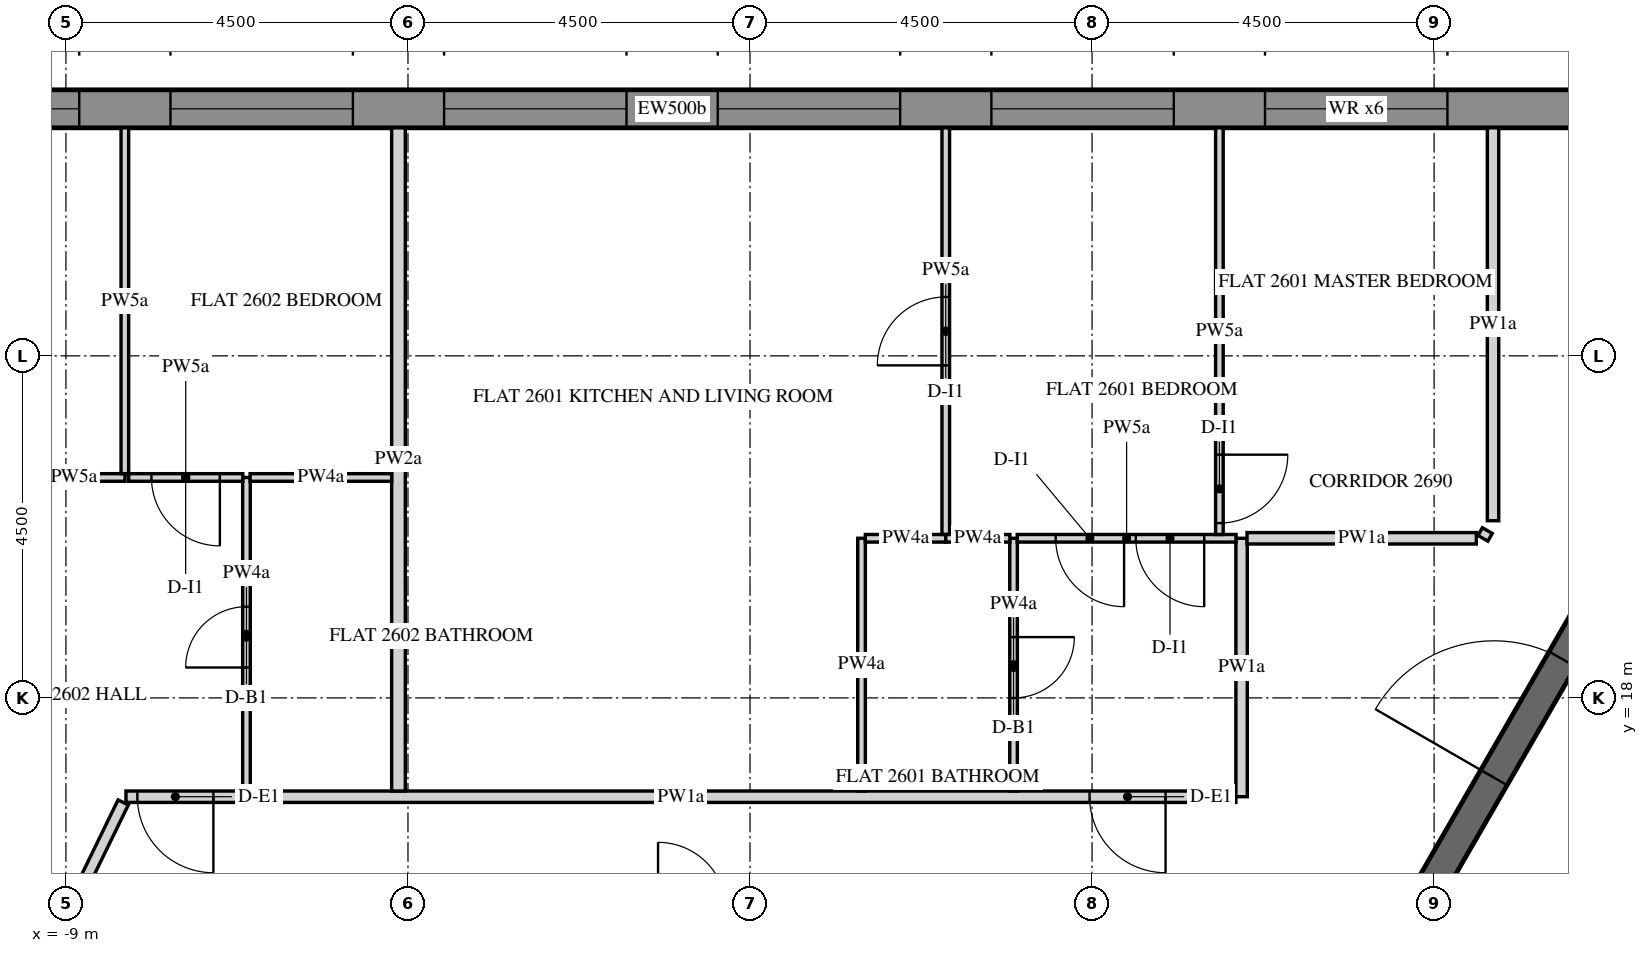
"""IFC4 building model, lengths in metres.
Left out: names, types, materials, properties, quantities, classifications, styles, units other than length and angle.
Written with IfcOpenShell. Run it as: python <this file> out.ifc"""

import sys

from ifc_helpers import new_model, si_unit, direction, frame, frame_2d, origin, place, context, subcontext, project, spatial, polyline, rectangle, outline, extrude, element, fill, save


model = new_model("IFC4")
c1 = context("Model", 3, precision=1e-05, world=origin(), true_north=direction((0.0, 1.0)))
c2 = subcontext(c1, "Body", "Model", "MODEL_VIEW")
j1 = project(units=[si_unit("LENGTHUNIT", "METRE"), si_unit("PLANEANGLEUNIT", "RADIAN")], contexts=[c1])
p1 = place(None, origin())
s1 = spatial("IfcSite", under=j1, at=p1, CompositionType="ELEMENT")
p2 = place(p1, origin())
s2 = spatial("IfcBuilding", under=s1, at=p2, CompositionType="ELEMENT")
p3 = place(p2, frame((0.0, 0.0, 334.2)))
s3 = spatial("IfcBuildingStorey", under=s2, at=p3, CompositionType="ELEMENT", Elevation=334.2)
p4 = place(p3, frame((11.698, 25.75, -0.15), z_axis=(0.0, 0.0, 1.0), x_axis=(-1.0, 0.0, 0.0)))
e1 = element("IfcWall", 1, at=p4, inside=s3, PredefinedType="SOLIDWALL", context=c2, shape_type="SweptSolid", body=[
    extrude(outline(polyline([(-0.021, -0.25), (25.468, -0.25), (25.421, 0.25), (0.021, 0.25), (-0.021, -0.25)])), origin(), (0.0, 0.0, 1.0), 3.75),
])
p5 = place(p4, frame((2.522, 0.0, 0.75)))
e2 = element("IfcOpeningElement", 2, at=p5, cuts=e1, PredefinedType="OPENING", context=c2, shape_type="SweptSolid", body=[
    extrude(rectangle(XDim=2.4, YDim=2.7, at=frame_2d((1.2, 1.35))), frame((0.0, 0.26, 0.0), z_axis=(0.0, -1.0, 0.0), x_axis=(1.0, 0.0, 0.0)), (0.0, 0.0, 1.0), 0.52),
])
p6 = place(p4, frame((6.122, 0.0, 0.75)))
e3 = element("IfcOpeningElement", 3, at=p6, cuts=e1, PredefinedType="OPENING", context=c2, shape_type="SweptSolid", body=[
    extrude(rectangle(XDim=2.4, YDim=2.7, at=frame_2d((1.2, 1.35))), frame((0.0, 0.26, 0.0), z_axis=(0.0, -1.0, 0.0), x_axis=(1.0, 0.0, 0.0)), (0.0, 0.0, 1.0), 0.52),
])
p7 = place(p4, frame((9.722, 0.0, 0.75)))
e4 = element("IfcOpeningElement", 4, at=p7, cuts=e1, PredefinedType="OPENING", context=c2, shape_type="SweptSolid", body=[
    extrude(rectangle(XDim=2.4, YDim=2.7, at=frame_2d((1.2, 1.35))), frame((0.0, 0.26, 0.0), z_axis=(0.0, -1.0, 0.0), x_axis=(1.0, 0.0, 0.0)), (0.0, 0.0, 1.0), 0.52),
])
p8 = place(p4, frame((13.323, 0.0, 0.75)))
e5 = element("IfcOpeningElement", 5, at=p8, cuts=e1, PredefinedType="OPENING", context=c2, shape_type="SweptSolid", body=[
    extrude(rectangle(XDim=2.4, YDim=2.7, at=frame_2d((1.2, 1.35))), frame((0.0, 0.26, 0.0), z_axis=(0.0, -1.0, 0.0), x_axis=(1.0, 0.0, 0.0)), (0.0, 0.0, 1.0), 0.52),
])
p9 = place(p4, frame((16.922, 0.0, 0.75)))
e6 = element("IfcOpeningElement", 6, at=p9, cuts=e1, PredefinedType="OPENING", context=c2, shape_type="SweptSolid", body=[
    extrude(rectangle(XDim=2.4, YDim=2.7, at=frame_2d((1.2, 1.35))), frame((0.0, 0.26, 0.0), z_axis=(0.0, -1.0, 0.0), x_axis=(1.0, 0.0, 0.0)), (0.0, 0.0, 1.0), 0.52),
])
p10 = place(p4, frame((20.522, 0.0, 0.75)))
e7 = element("IfcOpeningElement", 7, at=p10, cuts=e1, PredefinedType="OPENING", context=c2, shape_type="SweptSolid", body=[
    extrude(rectangle(XDim=2.4, YDim=2.7, at=frame_2d((1.2, 1.35))), frame((0.0, 0.26, 0.0), z_axis=(0.0, -1.0, 0.0), x_axis=(1.0, 0.0, 0.0)), (0.0, 0.0, 1.0), 0.52),
])
p11 = place(p3, frame((6.351, 11.0, -0.15), z_axis=(0.0, 0.0, 1.0), x_axis=(0.499998894578, 0.866026041999, 0.0)))
e8 = element("IfcWall", 8, at=p11, inside=s3, PredefinedType="SHEAR", context=c2, shape_type="SweptSolid", body=[
    extrude(rectangle(XDim=15.544, YDim=0.4, at=frame_2d((7.772, 0.0))), origin(), (0.0, 0.0, 1.0), 3.75),
])
p12 = place(p11, frame((6.872, 0.0, 0.15)))
e9 = element("IfcOpeningElement", 9, at=p12, cuts=e8, PredefinedType="OPENING", context=c2, shape_type="SweptSolid", body=[
    extrude(rectangle(XDim=1.8, YDim=2.4, at=frame_2d((0.9, 1.2))), frame((0.0, 0.21, 0.0), z_axis=(0.0, -1.0, 0.0), x_axis=(1.0, 0.0, 0.0)), (0.0, 0.0, 1.0), 0.42),
])
p13 = place(p3, frame((6.392, 16.7, 0.0), z_axis=(0.0, 0.0, 1.0), x_axis=(-1.0, 0.0, 0.0)))
e10 = element("IfcWall", 10, at=p13, inside=s3, PredefinedType="PARTITIONING", context=c2, shape_type="SweptSolid", body=[
    extrude(rectangle(XDim=14.602, YDim=0.15, at=frame_2d((7.301, 0.0))), origin(), (0.0, 0.0, 1.0), 2.838),
])
p14 = place(p13, frame((0.925, 0.0, 0.0)))
e11 = element("IfcOpeningElement", 11, at=p14, cuts=e10, PredefinedType="OPENING", context=c2, shape_type="SweptSolid", body=[
    extrude(rectangle(XDim=1.0, YDim=2.1, at=frame_2d((0.5, 1.05))), frame((0.0, 0.085, 0.0), z_axis=(0.0, -1.0, 0.0), x_axis=(1.0, 0.0, 0.0)), (0.0, 0.0, 1.0), 0.17),
])
p15 = place(p13, frame((13.452, 0.0, 0.0)))
e12 = element("IfcOpeningElement", 12, at=p15, cuts=e10, PredefinedType="OPENING", context=c2, shape_type="SweptSolid", body=[
    extrude(rectangle(XDim=1.0, YDim=2.1, at=frame_2d((0.5, 1.05))), frame((0.0, 0.085, 0.0), z_axis=(0.0, -1.0, 0.0), x_axis=(1.0, 0.0, 0.0)), (0.0, 0.0, 1.0), 0.17),
])
p16 = place(p3, frame((6.467, 20.1, 0.0), z_axis=(0.0, 0.0, 1.0), x_axis=(0.0, -1.0, 0.0)))
e13 = element("IfcWall", 13, at=p16, inside=s3, PredefinedType="PARTITIONING", context=c2, shape_type="SweptSolid", body=[
    extrude(rectangle(XDim=3.4, YDim=0.15, at=frame_2d((1.7, 0.0))), origin(), (0.0, 0.0, 1.0), 2.838),
])
p17 = place(p3, frame((9.775, 25.5, 0.0), z_axis=(0.0, 0.0, 1.0), x_axis=(0.0, -1.0, 0.0)))
e14 = element("IfcWall", 14, at=p17, inside=s3, PredefinedType="PARTITIONING", context=c2, shape_type="SweptSolid", body=[
    extrude(rectangle(XDim=5.169, YDim=0.15, at=frame_2d((2.584, 0.0))), origin(), (0.0, 0.0, 1.0), 2.838),
])
p18 = place(p3, frame((9.7, 20.201, 0.0), z_axis=(0.0, 0.0, 1.0), x_axis=(-0.49996389635, -0.866046247233, 0.0)))
e15 = element("IfcWall", 15, at=p18, inside=s3, PredefinedType="PARTITIONING", context=c2, shape_type="SweptSolid", body=[
    extrude(rectangle(XDim=0.117, YDim=0.15, at=frame_2d((0.058, 0.0))), origin(), (0.0, 0.0, 1.0), 2.838),
])
p19 = place(p3, frame((9.555, 20.1, 0.0), z_axis=(0.0, 0.0, 1.0), x_axis=(-1.0, 0.0, 0.0)))
e16 = element("IfcWall", 16, at=p19, inside=s3, PredefinedType="PARTITIONING", context=c2, shape_type="SweptSolid", body=[
    extrude(rectangle(XDim=3.017, YDim=0.15, at=frame_2d((1.508, 0.0))), origin(), (0.0, 0.0, 1.0), 2.838),
])
p20 = place(p3, frame((-8.247, 16.625, 0.0), z_axis=(0.0, 0.0, 1.0), x_axis=(-0.438376416131, -0.89879147625, 0.0)))
e17 = element("IfcWall", 17, at=p20, inside=s3, PredefinedType="PARTITIONING", context=c2, shape_type="SweptSolid", body=[
    extrude(rectangle(XDim=16.606, YDim=0.15, at=frame_2d((8.303, 0.0))), origin(), (0.0, 0.0, 1.0), 2.838),
])
p21 = place(p20, frame((6.103, 0.0, 0.0)))
e18 = element("IfcOpeningElement", 18, at=p21, cuts=e17, PredefinedType="OPENING", context=c2, shape_type="SweptSolid", body=[
    extrude(rectangle(XDim=1.0, YDim=2.1, at=frame_2d((0.5, 1.05))), frame((0.0, 0.085, 0.0), z_axis=(0.0, -1.0, 0.0), x_axis=(1.0, 0.0, 0.0)), (0.0, 0.0, 1.0), 0.17),
])
p22 = place(p3, frame((9.277, 12.668, 0.0), z_axis=(0.0, 0.0, 1.0), x_axis=(0.499991012162, 0.866030592853, 0.0)))
e19 = element("IfcWall", 19, at=p22, inside=s3, PredefinedType="PARTITIONING", context=c2, shape_type="SweptSolid", body=[
    extrude(rectangle(XDim=7.764, YDim=0.15, at=frame_2d((3.882, 0.0))), origin(), (0.0, 0.0, 1.0), 2.838),
])
p23 = place(p3, frame((1.467, 16.775, 0.0), z_axis=(0.0, 0.0, 1.0), x_axis=(0.0, 1.0, 0.0)))
e20 = element("IfcWall", 20, at=p23, inside=s3, PredefinedType="PARTITIONING", context=c2, shape_type="SweptSolid", body=[
    extrude(rectangle(XDim=3.325, YDim=0.1, at=frame_2d((1.663, 0.0))), origin(), (0.0, 0.0, 1.0), 2.838),
])
p24 = place(p3, frame((1.517, 20.1, 0.0), z_axis=(0.0, 0.0, 1.0), x_axis=(1.0, 0.0, 0.0)))
e21 = element("IfcWall", 21, at=p24, inside=s3, PredefinedType="PARTITIONING", context=c2, shape_type="SweptSolid", body=[
    extrude(rectangle(XDim=1.06, YDim=0.1, at=frame_2d((0.53, 0.0))), origin(), (0.0, 0.0, 1.0), 2.838),
])
p25 = place(p3, frame((2.575, 20.15, 0.0), z_axis=(0.0, 0.0, 1.0), x_axis=(0.0, 1.0, 0.0)))
e22 = element("IfcWall", 22, at=p25, inside=s3, PredefinedType="PARTITIONING", context=c2, shape_type="SweptSolid", body=[
    extrude(rectangle(XDim=5.35, YDim=0.1, at=frame_2d((2.675, 0.0))), origin(), (0.0, 0.0, 1.0), 2.838),
])
p26 = place(p25, frame((2.225, 0.0, 0.0)))
e23 = element("IfcOpeningElement", 23, at=p26, cuts=e22, PredefinedType="OPENING", context=c2, shape_type="SweptSolid", body=[
    extrude(rectangle(XDim=0.9, YDim=2.1, at=frame_2d((0.45, 1.05))), frame((0.0, 0.06, 0.0), z_axis=(0.0, -1.0, 0.0), x_axis=(1.0, 0.0, 0.0)), (0.0, 0.0, 1.0), 0.12),
])
p27 = place(p3, frame((-4.625, 25.5, 0.0), z_axis=(0.0, 0.0, 1.0), x_axis=(0.0, -1.0, 0.0)))
e24 = element("IfcWall", 24, at=p27, inside=s3, PredefinedType="PARTITIONING", context=c2, shape_type="SweptSolid", body=[
    extrude(rectangle(XDim=8.725, YDim=0.18, at=frame_2d((4.363, 0.0))), origin(), (0.0, 0.0, 1.0), 2.838),
])
p28 = place(p3, frame((3.467, 20.1, 0.0), z_axis=(0.0, 0.0, 1.0), x_axis=(0.0, -1.0, 0.0)))
e25 = element("IfcWall", 25, at=p28, inside=s3, PredefinedType="PARTITIONING", context=c2, shape_type="SweptSolid", body=[
    extrude(rectangle(XDim=3.325, YDim=0.1, at=frame_2d((1.663, 0.0))), origin(), (0.0, 0.0, 1.0), 2.838),
])
p29 = place(p28, frame((1.3, 0.0, 0.0)))
e26 = element("IfcOpeningElement", 26, at=p29, cuts=e25, PredefinedType="OPENING", context=c2, shape_type="SweptSolid", body=[
    extrude(rectangle(XDim=0.8, YDim=2.1, at=frame_2d((0.4, 1.05))), frame((0.0, 0.06, 0.0), z_axis=(0.0, -1.0, 0.0), x_axis=(1.0, 0.0, 0.0)), (0.0, 0.0, 1.0), 0.12),
])
p30 = place(p3, frame((6.394, 20.1, 0.0), z_axis=(0.0, 0.0, 1.0), x_axis=(-1.0, 0.0, 0.0)))
e27 = element("IfcWall", 27, at=p30, inside=s3, PredefinedType="PARTITIONING", context=c2, shape_type="SweptSolid", body=[
    extrude(rectangle(XDim=2.879, YDim=0.1, at=frame_2d((1.439, 0.0))), origin(), (0.0, 0.0, 1.0), 2.838),
])
p31 = place(p30, frame((0.419, 0.0, 0.0)))
e28 = element("IfcOpeningElement", 28, at=p31, cuts=e27, PredefinedType="OPENING", context=c2, shape_type="SweptSolid", body=[
    extrude(rectangle(XDim=0.9, YDim=2.1, at=frame_2d((0.45, 1.05))), frame((0.0, 0.06, 0.0), z_axis=(0.0, -1.0, 0.0), x_axis=(1.0, 0.0, 0.0)), (0.0, 0.0, 1.0), 0.12),
])
p32 = place(p30, frame((1.473, 0.0, 0.0)))
e29 = element("IfcOpeningElement", 29, at=p32, cuts=e27, PredefinedType="OPENING", context=c2, shape_type="SweptSolid", body=[
    extrude(rectangle(XDim=0.9, YDim=2.1, at=frame_2d((0.45, 1.05))), frame((0.0, 0.06, 0.0), z_axis=(0.0, -1.0, 0.0), x_axis=(1.0, 0.0, 0.0)), (0.0, 0.0, 1.0), 0.12),
])
p33 = place(p3, frame((3.419, 20.1, 0.0), z_axis=(0.0, 0.0, 1.0), x_axis=(-1.0, 0.0, 0.0)))
e30 = element("IfcWall", 30, at=p33, inside=s3, PredefinedType="PARTITIONING", context=c2, shape_type="SweptSolid", body=[
    extrude(rectangle(XDim=0.844, YDim=0.1, at=frame_2d((0.422, 0.0))), origin(), (0.0, 0.0, 1.0), 2.838),
])
p34 = place(p3, frame((6.175, 25.5, 0.0), z_axis=(0.0, 0.0, 1.0), x_axis=(0.0, -1.0, 0.0)))
e31 = element("IfcWall", 31, at=p34, inside=s3, PredefinedType="PARTITIONING", context=c2, shape_type="SweptSolid", body=[
    extrude(rectangle(XDim=5.35, YDim=0.1, at=frame_2d((2.675, 0.0))), origin(), (0.0, 0.0, 1.0), 2.838),
])
p35 = place(p34, frame((4.3, 0.0, 0.0)))
e32 = element("IfcOpeningElement", 32, at=p35, cuts=e31, PredefinedType="OPENING", context=c2, shape_type="SweptSolid", body=[
    extrude(rectangle(XDim=0.9, YDim=2.1, at=frame_2d((0.45, 1.05))), frame((0.0, 0.06, 0.0), z_axis=(0.0, -1.0, 0.0), x_axis=(1.0, 0.0, 0.0)), (0.0, 0.0, 1.0), 0.12),
])
p36 = place(p3, frame((-9.575, 20.9, 0.0), z_axis=(0.0, 0.0, 1.0), x_axis=(1.0, 0.0, 0.0)))
e33 = element("IfcWall", 33, at=p36, inside=s3, PredefinedType="PARTITIONING", context=c2, shape_type="SweptSolid", body=[
    extrude(rectangle(XDim=1.352, YDim=0.1, at=frame_2d((0.676, 0.0))), origin(), (0.0, 0.0, 1.0), 2.838),
])
p37 = place(p3, frame((-8.225, 20.95, 0.0), z_axis=(0.0, 0.0, 1.0), x_axis=(0.0, 1.0, 0.0)))
e34 = element("IfcWall", 34, at=p37, inside=s3, PredefinedType="PARTITIONING", context=c2, shape_type="SweptSolid", body=[
    extrude(rectangle(XDim=4.55, YDim=0.1, at=frame_2d((2.275, 0.0))), origin(), (0.0, 0.0, 1.0), 2.838),
])
p38 = place(p3, frame((-6.625, 16.775, 0.0), z_axis=(0.0, 0.0, 1.0), x_axis=(0.0, 1.0, 0.0)))
e35 = element("IfcWall", 35, at=p38, inside=s3, PredefinedType="PARTITIONING", context=c2, shape_type="SweptSolid", body=[
    extrude(rectangle(XDim=4.125, YDim=0.1, at=frame_2d((2.062, 0.0))), origin(), (0.0, 0.0, 1.0), 2.838),
])
p39 = place(p38, frame((1.625, 0.0, 0.0)))
e36 = element("IfcOpeningElement", 36, at=p39, cuts=e35, PredefinedType="OPENING", context=c2, shape_type="SweptSolid", body=[
    extrude(rectangle(XDim=0.8, YDim=2.1, at=frame_2d((0.4, 1.05))), frame((0.0, 0.06, 0.0), z_axis=(0.0, -1.0, 0.0), x_axis=(1.0, 0.0, 0.0)), (0.0, 0.0, 1.0), 0.12),
])
p40 = place(p3, frame((-6.673, 20.9, 0.0), z_axis=(0.0, 0.0, 1.0), x_axis=(-1.0, 0.0, 0.0)))
e37 = element("IfcWall", 37, at=p40, inside=s3, PredefinedType="PARTITIONING", context=c2, shape_type="SweptSolid", body=[
    extrude(rectangle(XDim=1.502, YDim=0.1, at=frame_2d((0.751, 0.0))), origin(), (0.0, 0.0, 1.0), 2.838),
])
p41 = place(p40, frame((0.302, 0.0, 0.0)))
e38 = element("IfcOpeningElement", 38, at=p41, cuts=e37, PredefinedType="OPENING", context=c2, shape_type="SweptSolid", body=[
    extrude(rectangle(XDim=0.9, YDim=2.1, at=frame_2d((0.45, 1.05))), frame((0.0, 0.06, 0.0), z_axis=(0.0, -1.0, 0.0), x_axis=(1.0, 0.0, 0.0)), (0.0, 0.0, 1.0), 0.12),
])
p42 = place(p3, frame((-4.715, 20.9, 0.0), z_axis=(0.0, 0.0, 1.0), x_axis=(-1.0, 0.0, 0.0)))
e39 = element("IfcWall", 39, at=p42, inside=s3, PredefinedType="PARTITIONING", context=c2, shape_type="SweptSolid", body=[
    extrude(rectangle(XDim=1.862, YDim=0.1, at=frame_2d((0.931, 0.0))), origin(), (0.0, 0.0, 1.0), 2.838),
])
p43 = place(p5, frame((0.0, 0.18, 0.0)))
e40 = element("IfcWindow", 40, at=p43, inside=s3, PartitioningType="DOUBLE_PANEL_VERTICAL", PredefinedType="WINDOW", context=c2, shape_type="SweptSolid", body=[
    extrude(rectangle(XDim=2.4, YDim=2.7, at=frame_2d((1.2, 1.35))), frame((0.0, 0.03, 0.0), z_axis=(0.0, -1.0, 0.0), x_axis=(1.0, 0.0, 0.0)), (0.0, 0.0, 1.0), 0.06),
])
fill(e2, e40)
p44 = place(p6, frame((0.0, 0.18, 0.0)))
e41 = element("IfcWindow", 41, at=p44, inside=s3, PartitioningType="DOUBLE_PANEL_VERTICAL", PredefinedType="WINDOW", context=c2, shape_type="SweptSolid", body=[
    extrude(rectangle(XDim=2.4, YDim=2.7, at=frame_2d((1.2, 1.35))), frame((0.0, 0.03, 0.0), z_axis=(0.0, -1.0, 0.0), x_axis=(1.0, 0.0, 0.0)), (0.0, 0.0, 1.0), 0.06),
])
fill(e3, e41)
p45 = place(p7, frame((0.0, 0.18, 0.0)))
e42 = element("IfcWindow", 42, at=p45, inside=s3, PartitioningType="DOUBLE_PANEL_VERTICAL", PredefinedType="WINDOW", context=c2, shape_type="SweptSolid", body=[
    extrude(rectangle(XDim=2.4, YDim=2.7, at=frame_2d((1.2, 1.35))), frame((0.0, 0.03, 0.0), z_axis=(0.0, -1.0, 0.0), x_axis=(1.0, 0.0, 0.0)), (0.0, 0.0, 1.0), 0.06),
])
fill(e4, e42)
p46 = place(p8, frame((0.0, 0.18, 0.0)))
e43 = element("IfcWindow", 43, at=p46, inside=s3, PartitioningType="DOUBLE_PANEL_VERTICAL", PredefinedType="WINDOW", context=c2, shape_type="SweptSolid", body=[
    extrude(rectangle(XDim=2.4, YDim=2.7, at=frame_2d((1.2, 1.35))), frame((0.0, 0.03, 0.0), z_axis=(0.0, -1.0, 0.0), x_axis=(1.0, 0.0, 0.0)), (0.0, 0.0, 1.0), 0.06),
])
fill(e5, e43)
p47 = place(p9, frame((0.0, 0.18, 0.0)))
e44 = element("IfcWindow", 44, at=p47, inside=s3, PartitioningType="DOUBLE_PANEL_VERTICAL", PredefinedType="WINDOW", context=c2, shape_type="SweptSolid", body=[
    extrude(rectangle(XDim=2.4, YDim=2.7, at=frame_2d((1.2, 1.35))), frame((0.0, 0.03, 0.0), z_axis=(0.0, -1.0, 0.0), x_axis=(1.0, 0.0, 0.0)), (0.0, 0.0, 1.0), 0.06),
])
fill(e6, e44)
p48 = place(p10, frame((0.0, 0.18, 0.0)))
e45 = element("IfcWindow", 45, at=p48, inside=s3, PartitioningType="DOUBLE_PANEL_VERTICAL", PredefinedType="WINDOW", context=c2, shape_type="SweptSolid", body=[
    extrude(rectangle(XDim=2.4, YDim=2.7, at=frame_2d((1.2, 1.35))), frame((0.0, 0.03, 0.0), z_axis=(0.0, -1.0, 0.0), x_axis=(1.0, 0.0, 0.0)), (0.0, 0.0, 1.0), 0.06),
])
fill(e7, e45)
p49 = place(p12, origin())
e46 = element("IfcDoor", 46, at=p49, inside=s3, OperationType="DOUBLE_DOOR_SINGLE_SWING", PredefinedType="DOOR", context=c2, shape_type="SweptSolid", body=[
    extrude(rectangle(XDim=1.8, YDim=2.4, at=frame_2d((0.9, 1.2))), frame((0.0, 0.025, 0.0), z_axis=(0.0, -1.0, 0.0), x_axis=(1.0, 0.0, 0.0)), (0.0, 0.0, 1.0), 0.05),
])
fill(e9, e46)
p50 = place(p14, origin())
e47 = element("IfcDoor", 47, at=p50, inside=s3, OperationType="SINGLE_SWING_RIGHT", PredefinedType="DOOR", context=c2, shape_type="SweptSolid", body=[
    extrude(rectangle(XDim=1.0, YDim=2.1, at=frame_2d((0.5, 1.05))), frame((0.0, 0.025, 0.0), z_axis=(0.0, -1.0, 0.0), x_axis=(1.0, 0.0, 0.0)), (0.0, 0.0, 1.0), 0.05),
])
fill(e11, e47)
p51 = place(p29, origin())
e48 = element("IfcDoor", 48, at=p51, inside=s3, OperationType="SINGLE_SWING_LEFT", PredefinedType="DOOR", context=c2, shape_type="SweptSolid", body=[
    extrude(rectangle(XDim=0.8, YDim=2.1, at=frame_2d((0.4, 1.05))), frame((0.0, 0.025, 0.0), z_axis=(0.0, -1.0, 0.0), x_axis=(1.0, 0.0, 0.0)), (0.0, 0.0, 1.0), 0.05),
])
fill(e26, e48)
p52 = place(p31, origin())
e49 = element("IfcDoor", 49, at=p52, inside=s3, OperationType="SINGLE_SWING_LEFT", PredefinedType="DOOR", context=c2, shape_type="SweptSolid", body=[
    extrude(rectangle(XDim=0.9, YDim=2.1, at=frame_2d((0.45, 1.05))), frame((0.0, 0.025, 0.0), z_axis=(0.0, -1.0, 0.0), x_axis=(1.0, 0.0, 0.0)), (0.0, 0.0, 1.0), 0.05),
])
fill(e28, e49)
p53 = place(p35, origin())
e50 = element("IfcDoor", 50, at=p53, inside=s3, OperationType="SINGLE_SWING_RIGHT", PredefinedType="DOOR", context=c2, shape_type="SweptSolid", body=[
    extrude(rectangle(XDim=0.9, YDim=2.1, at=frame_2d((0.45, 1.05))), frame((0.0, 0.025, 0.0), z_axis=(0.0, -1.0, 0.0), x_axis=(1.0, 0.0, 0.0)), (0.0, 0.0, 1.0), 0.05),
])
fill(e32, e50)
p54 = place(p32, origin())
e51 = element("IfcDoor", 51, at=p54, inside=s3, OperationType="SINGLE_SWING_LEFT", PredefinedType="DOOR", context=c2, shape_type="SweptSolid", body=[
    extrude(rectangle(XDim=0.9, YDim=2.1, at=frame_2d((0.45, 1.05))), frame((0.0, 0.025, 0.0), z_axis=(0.0, -1.0, 0.0), x_axis=(1.0, 0.0, 0.0)), (0.0, 0.0, 1.0), 0.05),
])
fill(e29, e51)
p55 = place(p15, origin())
e52 = element("IfcDoor", 52, at=p55, inside=s3, OperationType="SINGLE_SWING_LEFT", PredefinedType="DOOR", context=c2, shape_type="SweptSolid", body=[
    extrude(rectangle(XDim=1.0, YDim=2.1, at=frame_2d((0.5, 1.05))), frame((0.0, 0.025, 0.0), z_axis=(0.0, -1.0, 0.0), x_axis=(1.0, 0.0, 0.0)), (0.0, 0.0, 1.0), 0.05),
])
fill(e12, e52)
p56 = place(p39, origin())
e53 = element("IfcDoor", 53, at=p56, inside=s3, OperationType="SINGLE_SWING_RIGHT", PredefinedType="DOOR", context=c2, shape_type="SweptSolid", body=[
    extrude(rectangle(XDim=0.8, YDim=2.1, at=frame_2d((0.4, 1.05))), frame((0.0, 0.025, 0.0), z_axis=(0.0, -1.0, 0.0), x_axis=(1.0, 0.0, 0.0)), (0.0, 0.0, 1.0), 0.05),
])
fill(e36, e53)
p57 = place(p41, origin())
e54 = element("IfcDoor", 54, at=p57, inside=s3, OperationType="SINGLE_SWING_RIGHT", PredefinedType="DOOR", context=c2, shape_type="SweptSolid", body=[
    extrude(rectangle(XDim=0.9, YDim=2.1, at=frame_2d((0.45, 1.05))), frame((0.0, 0.025, 0.0), z_axis=(0.0, -1.0, 0.0), x_axis=(1.0, 0.0, 0.0)), (0.0, 0.0, 1.0), 0.05),
])
fill(e38, e54)
p58 = place(p26, origin())
e55 = element("IfcDoor", 55, at=p58, inside=s3, OperationType="SINGLE_SWING_LEFT", PredefinedType="DOOR", context=c2, shape_type="SweptSolid", body=[
    extrude(rectangle(XDim=0.9, YDim=2.1, at=frame_2d((0.45, 1.05))), frame((0.0, 0.025, 0.0), z_axis=(0.0, -1.0, 0.0), x_axis=(1.0, 0.0, 0.0)), (0.0, 0.0, 1.0), 0.05),
])
fill(e23, e55)
save(model, sys.argv[1])
